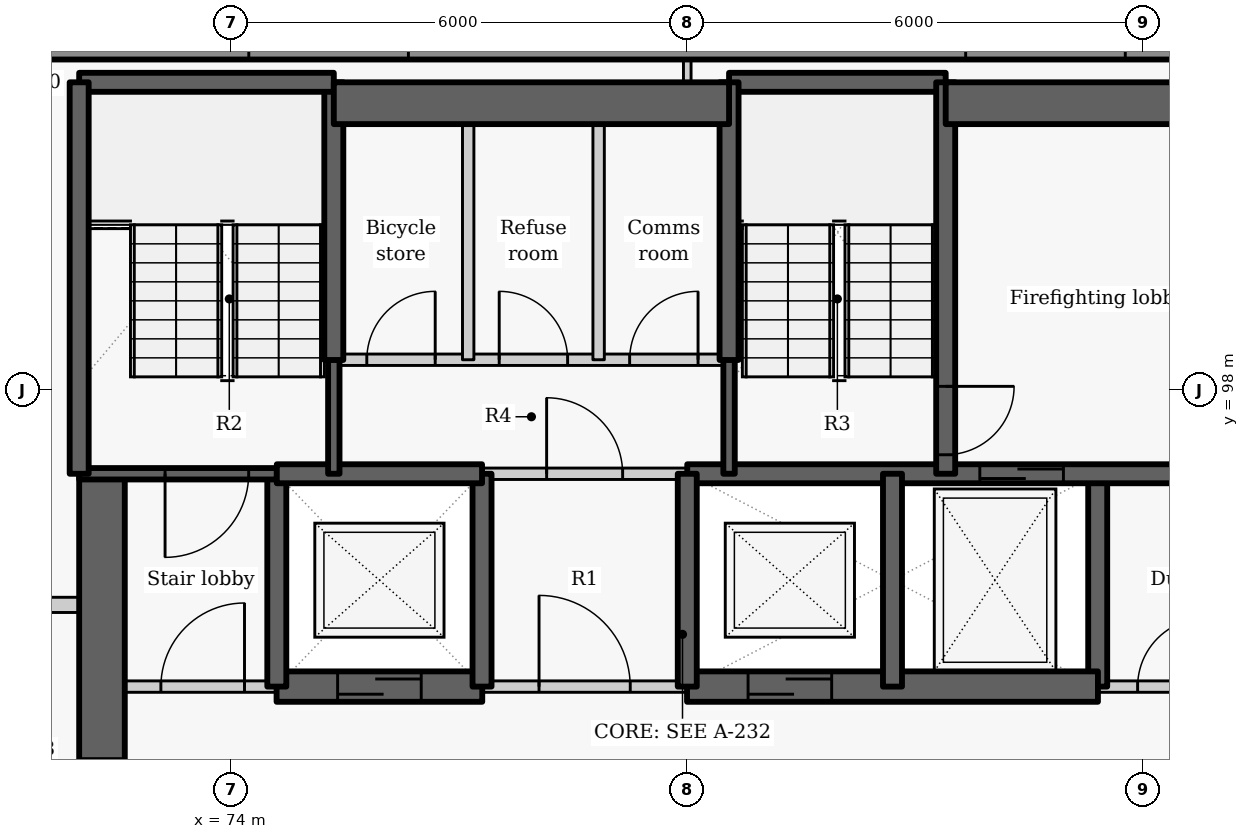
"""IFC4 building model, lengths in metres.
Left out: names, types, materials, properties, quantities, classifications, styles, units other than length and angle.
Written with IfcOpenShell. Run it as: python <this file> out.ifc"""

import sys

from ifc_helpers import new_model, si_unit, direction, frame, frame_2d, origin, place, context, subcontext, project, spatial, rectangle, extrude, element, fill, save


model = new_model("IFC4")
c1 = context("Model", 3, precision=1e-05, world=origin(), true_north=direction((0.0, 1.0)))
c2 = subcontext(c1, "Body", "Model", "MODEL_VIEW")
j1 = project(units=[si_unit("LENGTHUNIT", "METRE"), si_unit("PLANEANGLEUNIT", "RADIAN")], contexts=[c1])
p1 = place(None, origin())
s1 = spatial("IfcSite", under=j1, at=p1, CompositionType="ELEMENT")
p2 = place(p1, origin())
s2 = spatial("IfcBuilding", under=s1, at=p2, CompositionType="ELEMENT")
p3 = place(p2, frame((0.0, 0.0, 180.0)))
s3 = spatial("IfcBuildingStorey", under=s2, at=p3, CompositionType="ELEMENT", Elevation=180.0)
p4 = place(p3, frame((89.449, 102.5, 0.0), z_axis=(0.0, 0.0, 1.0), x_axis=(-1.0, 0.0, 0.0)))
e1 = element("IfcWall", 1, at=p4, inside=s3, PredefinedType="SOLIDWALL", context=c2, shape_type="SweptSolid", body=[
    extrude(rectangle(XDim=18.933, YDim=0.3, at=frame_2d((9.466, 0.0))), origin(), (0.0, 0.0, 1.0), 2.425),
])
p5 = place(p4, frame((3.687, 0.0, 0.9)))
e2 = element("IfcOpeningElement", 2, at=p5, cuts=e1, PredefinedType="OPENING", context=c2, shape_type="SweptSolid", body=[
    extrude(rectangle(XDim=2.1, YDim=1.1, at=frame_2d((1.05, 0.55))), frame((0.0, 0.16, 0.0), z_axis=(0.0, -1.0, 0.0), x_axis=(1.0, 0.0, 0.0)), (0.0, 0.0, 1.0), 0.32),
])
p6 = place(p4, frame((13.118, 0.0, 0.9)))
e3 = element("IfcOpeningElement", 3, at=p6, cuts=e1, PredefinedType="OPENING", context=c2, shape_type="SweptSolid", body=[
    extrude(rectangle(XDim=2.1, YDim=1.1, at=frame_2d((1.05, 0.55))), frame((0.0, 0.16, 0.0), z_axis=(0.0, -1.0, 0.0), x_axis=(1.0, 0.0, 0.0)), (0.0, 0.0, 1.0), 0.32),
])
p7 = place(p3, frame((72.3, 87.8, -0.275), z_axis=(0.0, 0.0, 1.0), x_axis=(0.0, 1.0, 0.0)))
e4 = element("IfcWall", 4, at=p7, inside=s3, PredefinedType="SHEAR", context=c2, shape_type="SweptSolid", body=[
    extrude(rectangle(XDim=9.1, YDim=0.6, at=frame_2d((4.55, 0.0))), origin(), (0.0, 0.0, 1.0), 3.3),
])
p8 = place(p7, frame((3.852, 0.0, 0.275)))
e5 = element("IfcOpeningElement", 5, at=p8, cuts=e4, PredefinedType="OPENING", context=c2, shape_type="SweptSolid", body=[
    extrude(rectangle(XDim=1.5, YDim=2.1, at=frame_2d((0.75, 1.05))), frame((0.0, 0.31, 0.0), z_axis=(0.0, -1.0, 0.0), x_axis=(1.0, 0.0, 0.0)), (0.0, 0.0, 1.0), 0.62),
])
p9 = place(p3, frame((85.4, 94.1, -0.275), z_axis=(0.0, 0.0, 1.0), x_axis=(0.0, 1.0, 0.0)))
e6 = element("IfcWall", 6, at=p9, inside=s3, PredefinedType="SHEAR", context=c2, shape_type="SweptSolid", body=[
    extrude(rectangle(XDim=2.8, YDim=0.25, at=frame_2d((1.4, 0.0))), origin(), (0.0, 0.0, 1.0), 3.3),
])
p10 = place(p3, frame((72.0, 94.1, 0.0), z_axis=(0.0, 0.0, 1.0), x_axis=(1.0, 0.0, 0.0)))
e7 = element("IfcWall", 7, at=p10, inside=s3, PredefinedType="PARTITIONING", context=c2, shape_type="SweptSolid", body=[
    extrude(rectangle(XDim=2.603, YDim=0.15, at=frame_2d((1.302, 0.0))), origin(), (0.0, 0.0, 1.0), 3.025),
])
p11 = place(p10, frame((1.075, 0.0, 0.0)))
e8 = element("IfcOpeningElement", 8, at=p11, cuts=e7, PredefinedType="OPENING", context=c2, shape_type="SweptSolid", body=[
    extrude(rectangle(XDim=1.1, YDim=2.1, at=frame_2d((0.55, 1.05))), frame((0.0, 0.085, 0.0), z_axis=(0.0, -1.0, 0.0), x_axis=(1.0, 0.0, 0.0)), (0.0, 0.0, 1.0), 0.17),
])
p12 = place(p3, frame((77.297, 94.1, 0.0), z_axis=(0.0, 0.0, 1.0), x_axis=(1.0, 0.0, 0.0)))
e9 = element("IfcWall", 9, at=p12, inside=s3, PredefinedType="PARTITIONING", context=c2, shape_type="SweptSolid", body=[
    extrude(rectangle(XDim=2.706, YDim=0.15, at=frame_2d((1.353, 0.0))), origin(), (0.0, 0.0, 1.0), 3.025),
])
p13 = place(p12, frame((0.753, 0.0, 0.0)))
e10 = element("IfcOpeningElement", 10, at=p13, cuts=e9, PredefinedType="OPENING", context=c2, shape_type="SweptSolid", body=[
    extrude(rectangle(XDim=1.2, YDim=2.1, at=frame_2d((0.6, 1.05))), frame((0.0, 0.085, 0.0), z_axis=(0.0, -1.0, 0.0), x_axis=(1.0, 0.0, 0.0)), (0.0, 0.0, 1.0), 0.17),
])
p14 = place(p3, frame((85.397, 94.1, 0.0), z_axis=(0.0, 0.0, 1.0), x_axis=(1.0, 0.0, 0.0)))
e11 = element("IfcWall", 11, at=p14, inside=s3, PredefinedType="PARTITIONING", context=c2, shape_type="SweptSolid", body=[
    extrude(rectangle(XDim=2.603, YDim=0.15, at=frame_2d((1.302, 0.0))), origin(), (0.0, 0.0, 1.0), 3.025),
])
p15 = place(p14, frame((0.528, 0.0, 0.0)))
e12 = element("IfcOpeningElement", 12, at=p15, cuts=e11, PredefinedType="OPENING", context=c2, shape_type="SweptSolid", body=[
    extrude(rectangle(XDim=0.9, YDim=2.1, at=frame_2d((0.45, 1.05))), frame((0.0, 0.085, 0.0), z_axis=(0.0, -1.0, 0.0), x_axis=(1.0, 0.0, 0.0)), (0.0, 0.0, 1.0), 0.17),
])
p16 = place(p3, frame((74.597, 94.1, -0.275), z_axis=(0.0, 0.0, 1.0), x_axis=(1.0, 0.0, 0.0)))
e13 = element("IfcWall", 13, at=p16, inside=s3, PredefinedType="SHEAR", context=c2, shape_type="SweptSolid", body=[
    extrude(rectangle(XDim=2.706, YDim=0.4, at=frame_2d((1.353, 0.0))), origin(), (0.0, 0.0, 1.0), 3.3),
])
p17 = place(p16, frame((0.803, 0.0, 0.275)))
e14 = element("IfcOpeningElement", 14, at=p17, cuts=e13, PredefinedType="OPENING", context=c2, shape_type="SweptSolid", body=[
    extrude(rectangle(XDim=1.1, YDim=2.1, at=frame_2d((0.55, 1.05))), frame((0.0, 0.21, 0.0), z_axis=(0.0, -1.0, 0.0), x_axis=(1.0, 0.0, 0.0)), (0.0, 0.0, 1.0), 0.42),
])
p18 = place(p3, frame((79.997, 94.1, -0.275), z_axis=(0.0, 0.0, 1.0), x_axis=(1.0, 0.0, 0.0)))
e15 = element("IfcWall", 15, at=p18, inside=s3, PredefinedType="SHEAR", context=c2, shape_type="SweptSolid", body=[
    extrude(rectangle(XDim=5.406, YDim=0.4, at=frame_2d((2.703, 0.0))), origin(), (0.0, 0.0, 1.0), 3.3),
])
p19 = place(p18, frame((0.803, 0.0, 0.275)))
e16 = element("IfcOpeningElement", 16, at=p19, cuts=e15, PredefinedType="OPENING", context=c2, shape_type="SweptSolid", body=[
    extrude(rectangle(XDim=1.1, YDim=2.1, at=frame_2d((0.55, 1.05))), frame((0.0, 0.21, 0.0), z_axis=(0.0, -1.0, 0.0), x_axis=(1.0, 0.0, 0.0)), (0.0, 0.0, 1.0), 0.42),
])
p20 = place(p3, frame((74.6, 94.1, -0.275), z_axis=(0.0, 0.0, 1.0), x_axis=(0.0, 1.0, 0.0)))
e17 = element("IfcWall", 17, at=p20, inside=s3, PredefinedType="SHEAR", context=c2, shape_type="SweptSolid", body=[
    extrude(rectangle(XDim=2.8, YDim=0.25, at=frame_2d((1.4, 0.0))), origin(), (0.0, 0.0, 1.0), 3.3),
])
p21 = place(p3, frame((74.6, 96.9, -0.275), z_axis=(0.0, 0.0, 1.0), x_axis=(-1.0, 0.0, 0.0)))
e18 = element("IfcWall", 18, at=p21, inside=s3, PredefinedType="SHEAR", context=c2, shape_type="SweptSolid", body=[
    extrude(rectangle(XDim=2.6, YDim=0.15, at=frame_2d((1.3, 0.0))), origin(), (0.0, 0.0, 1.0), 3.3),
])
p22 = place(p21, frame((0.37, 0.0, 0.275)))
e19 = element("IfcOpeningElement", 19, at=p22, cuts=e18, PredefinedType="OPENING", context=c2, shape_type="SweptSolid", body=[
    extrude(rectangle(XDim=1.1, YDim=2.1, at=frame_2d((0.55, 1.05))), frame((0.0, 0.085, 0.0), z_axis=(0.0, -1.0, 0.0), x_axis=(1.0, 0.0, 0.0)), (0.0, 0.0, 1.0), 0.17),
])
p23 = place(p3, frame((77.3, 94.1, -0.275), z_axis=(0.0, 0.0, 1.0), x_axis=(0.0, 1.0, 0.0)))
e20 = element("IfcWall", 20, at=p23, inside=s3, PredefinedType="SHEAR", context=c2, shape_type="SweptSolid", body=[
    extrude(rectangle(XDim=2.8, YDim=0.25, at=frame_2d((1.4, 0.0))), origin(), (0.0, 0.0, 1.0), 3.3),
])
p24 = place(p3, frame((74.6, 96.9, -0.275), z_axis=(0.0, 0.0, 1.0), x_axis=(1.0, 0.0, 0.0)))
e21 = element("IfcWall", 21, at=p24, inside=s3, PredefinedType="SHEAR", context=c2, shape_type="SweptSolid", body=[
    extrude(rectangle(XDim=2.7, YDim=0.25, at=frame_2d((1.35, 0.0))), origin(), (0.0, 0.0, 1.0), 3.3),
])
p25 = place(p3, frame((80.0, 96.9, -0.275), z_axis=(0.0, 0.0, 1.0), x_axis=(1.0, 0.0, 0.0)))
e22 = element("IfcWall", 22, at=p25, inside=s3, PredefinedType="SHEAR", context=c2, shape_type="SweptSolid", body=[
    extrude(rectangle(XDim=8.0, YDim=0.25, at=frame_2d((4.0, 0.0))), origin(), (0.0, 0.0, 1.0), 3.3),
])
p26 = place(p25, frame((3.849, 0.0, 0.275)))
e23 = element("IfcOpeningElement", 23, at=p26, cuts=e22, PredefinedType="OPENING", context=c2, shape_type="SweptSolid", body=[
    extrude(rectangle(XDim=1.1, YDim=2.1, at=frame_2d((0.55, 1.05))), frame((0.0, 0.135, 0.0), z_axis=(0.0, -1.0, 0.0), x_axis=(1.0, 0.0, 0.0)), (0.0, 0.0, 1.0), 0.27),
])
p27 = place(p3, frame((80.0, 94.1, -0.275), z_axis=(0.0, 0.0, 1.0), x_axis=(0.0, 1.0, 0.0)))
e24 = element("IfcWall", 24, at=p27, inside=s3, PredefinedType="SHEAR", context=c2, shape_type="SweptSolid", body=[
    extrude(rectangle(XDim=2.8, YDim=0.25, at=frame_2d((1.4, 0.0))), origin(), (0.0, 0.0, 1.0), 3.3),
])
p28 = place(p3, frame((77.3, 96.9, 0.0), z_axis=(0.0, 0.0, 1.0), x_axis=(1.0, 0.0, 0.0)))
e25 = element("IfcWall", 25, at=p28, inside=s3, PredefinedType="PARTITIONING", context=c2, shape_type="SweptSolid", body=[
    extrude(rectangle(XDim=2.7, YDim=0.15, at=frame_2d((1.35, 0.0))), origin(), (0.0, 0.0, 1.0), 3.025),
])
p29 = place(p28, frame((0.85, 0.0, 0.0)))
e26 = element("IfcOpeningElement", 26, at=p29, cuts=e25, PredefinedType="OPENING", context=c2, shape_type="SweptSolid", body=[
    extrude(rectangle(XDim=1.0, YDim=2.1, at=frame_2d((0.5, 1.05))), frame((0.0, 0.085, 0.0), z_axis=(0.0, -1.0, 0.0), x_axis=(1.0, 0.0, 0.0)), (0.0, 0.0, 1.0), 0.17),
])
p30 = place(p3, frame((82.7, 94.1, -0.275), z_axis=(0.0, 0.0, 1.0), x_axis=(0.0, 1.0, 0.0)))
e27 = element("IfcWall", 27, at=p30, inside=s3, PredefinedType="SHEAR", context=c2, shape_type="SweptSolid", body=[
    extrude(rectangle(XDim=2.8, YDim=0.25, at=frame_2d((1.4, 0.0))), origin(), (0.0, 0.0, 1.0), 3.3),
])
p31 = place(p3, frame((75.35, 96.9, -0.275), z_axis=(0.0, 0.0, 1.0), x_axis=(0.0, 1.0, 0.0)))
e28 = element("IfcWall", 28, at=p31, inside=s3, PredefinedType="SHEAR", context=c2, shape_type="SweptSolid", body=[
    extrude(rectangle(XDim=1.503, YDim=0.15, at=frame_2d((0.751, 0.0))), origin(), (0.0, 0.0, 1.0), 3.3),
])
p32 = place(p3, frame((75.35, 98.397, -0.275), z_axis=(0.0, 0.0, 1.0), x_axis=(0.0, 1.0, 0.0)))
e29 = element("IfcWall", 29, at=p32, inside=s3, PredefinedType="SHEAR", context=c2, shape_type="SweptSolid", body=[
    extrude(rectangle(XDim=3.653, YDim=0.25, at=frame_2d((1.827, 0.0))), origin(), (0.0, 0.0, 1.0), 3.3),
])
p33 = place(p3, frame((72.0, 102.05, -0.275), z_axis=(0.0, 0.0, 1.0), x_axis=(1.0, 0.0, 0.0)))
e30 = element("IfcWall", 30, at=p33, inside=s3, PredefinedType="SHEAR", context=c2, shape_type="SweptSolid", body=[
    extrude(rectangle(XDim=3.35, YDim=0.25, at=frame_2d((1.675, 0.0))), origin(), (0.0, 0.0, 1.0), 3.3),
])
p34 = place(p3, frame((80.55, 102.05, -0.275), z_axis=(0.0, 0.0, 1.0), x_axis=(1.0, 0.0, 0.0)))
e31 = element("IfcWall", 31, at=p34, inside=s3, PredefinedType="SHEAR", context=c2, shape_type="SweptSolid", body=[
    extrude(rectangle(XDim=2.85, YDim=0.25, at=frame_2d((1.425, 0.0))), origin(), (0.0, 0.0, 1.0), 3.3),
])
p35 = place(p3, frame((72.0, 96.9, -0.275), z_axis=(0.0, 0.0, 1.0), x_axis=(0.0, 1.0, 0.0)))
e32 = element("IfcWall", 32, at=p35, inside=s3, PredefinedType="SHEAR", context=c2, shape_type="SweptSolid", body=[
    extrude(rectangle(XDim=5.15, YDim=0.25, at=frame_2d((2.575, 0.0))), origin(), (0.0, 0.0, 1.0), 3.3),
])
p36 = place(p3, frame((83.4, 102.05, -0.275), z_axis=(0.0, 0.0, 1.0), x_axis=(0.0, -1.0, 0.0)))
e33 = element("IfcWall", 33, at=p36, inside=s3, PredefinedType="SHEAR", context=c2, shape_type="SweptSolid", body=[
    extrude(rectangle(XDim=5.15, YDim=0.25, at=frame_2d((2.575, 0.0))), origin(), (0.0, 0.0, 1.0), 3.3),
])
p37 = place(p36, frame((4.0, 0.0, 0.275)))
e34 = element("IfcOpeningElement", 34, at=p37, cuts=e33, PredefinedType="OPENING", context=c2, shape_type="SweptSolid", body=[
    extrude(rectangle(XDim=0.9, YDim=2.1, at=frame_2d((0.45, 1.05))), frame((0.0, 0.135, 0.0), z_axis=(0.0, -1.0, 0.0), x_axis=(1.0, 0.0, 0.0)), (0.0, 0.0, 1.0), 0.27),
])
p38 = place(p3, frame((80.55, 96.9, -0.275), z_axis=(0.0, 0.0, 1.0), x_axis=(0.0, 1.0, 0.0)))
e35 = element("IfcWall", 35, at=p38, inside=s3, PredefinedType="SHEAR", context=c2, shape_type="SweptSolid", body=[
    extrude(rectangle(XDim=1.503, YDim=0.15, at=frame_2d((0.751, 0.0))), origin(), (0.0, 0.0, 1.0), 3.3),
])
p39 = place(p3, frame((80.55, 98.397, -0.275), z_axis=(0.0, 0.0, 1.0), x_axis=(0.0, 1.0, 0.0)))
e36 = element("IfcWall", 36, at=p39, inside=s3, PredefinedType="SHEAR", context=c2, shape_type="SweptSolid", body=[
    extrude(rectangle(XDim=3.653, YDim=0.25, at=frame_2d((1.827, 0.0))), origin(), (0.0, 0.0, 1.0), 3.3),
])
p40 = place(p3, frame((75.35, 101.775, -0.275), z_axis=(0.0, 0.0, 1.0), x_axis=(1.0, 0.0, 0.0)))
e37 = element("IfcWall", 37, at=p40, inside=s3, PredefinedType="SHEAR", context=c2, shape_type="SweptSolid", body=[
    extrude(rectangle(XDim=5.2, YDim=0.55, at=frame_2d((2.6, 0.0))), origin(), (0.0, 0.0, 1.0), 3.3),
])
p41 = place(p3, frame((83.4, 101.775, -0.275), z_axis=(0.0, 0.0, 1.0), x_axis=(1.0, 0.0, 0.0)))
e38 = element("IfcWall", 38, at=p41, inside=s3, PredefinedType="SHEAR", context=c2, shape_type="SweptSolid", body=[
    extrude(rectangle(XDim=4.6, YDim=0.55, at=frame_2d((2.3, 0.0))), origin(), (0.0, 0.0, 1.0), 3.3),
])
p42 = place(p3, frame((75.35, 98.4, 0.0), z_axis=(0.0, 0.0, 1.0), x_axis=(1.0, 0.0, 0.0)))
e39 = element("IfcWall", 39, at=p42, inside=s3, PredefinedType="PARTITIONING", context=c2, shape_type="SweptSolid", body=[
    extrude(rectangle(XDim=5.2, YDim=0.15, at=frame_2d((2.6, 0.0))), origin(), (0.0, 0.0, 1.0), 3.025),
])
p43 = place(p42, frame((0.434, 0.0, 0.0)))
e40 = element("IfcOpeningElement", 40, at=p43, cuts=e39, PredefinedType="OPENING", context=c2, shape_type="SweptSolid", body=[
    extrude(rectangle(XDim=0.9, YDim=2.1, at=frame_2d((0.45, 1.05))), frame((0.0, 0.085, 0.0), z_axis=(0.0, -1.0, 0.0), x_axis=(1.0, 0.0, 0.0)), (0.0, 0.0, 1.0), 0.17),
])
p44 = place(p42, frame((2.176, 0.0, 0.0)))
e41 = element("IfcOpeningElement", 41, at=p44, cuts=e39, PredefinedType="OPENING", context=c2, shape_type="SweptSolid", body=[
    extrude(rectangle(XDim=0.9, YDim=2.1, at=frame_2d((0.45, 1.05))), frame((0.0, 0.085, 0.0), z_axis=(0.0, -1.0, 0.0), x_axis=(1.0, 0.0, 0.0)), (0.0, 0.0, 1.0), 0.17),
])
p45 = place(p42, frame((3.892, 0.0, 0.0)))
e42 = element("IfcOpeningElement", 42, at=p45, cuts=e39, PredefinedType="OPENING", context=c2, shape_type="SweptSolid", body=[
    extrude(rectangle(XDim=0.9, YDim=2.1, at=frame_2d((0.45, 1.05))), frame((0.0, 0.085, 0.0), z_axis=(0.0, -1.0, 0.0), x_axis=(1.0, 0.0, 0.0)), (0.0, 0.0, 1.0), 0.17),
])
for number, where, z_axis, x_axis in (
    (43, (77.118, 98.4, 0.0), (0.0, 0.0, 1.0), (0.0, 1.0, 0.0)),
    (44, (78.834, 98.4, 0.0), (0.0, 0.0, 1.0), (0.0, 1.0, 0.0)),
):
    element("IfcWall", number, at=place(p3, frame(where, z_axis=z_axis, x_axis=x_axis)), inside=s3, PredefinedType="PARTITIONING", context=c2, shape_type="SweptSolid", body=[
        extrude(rectangle(XDim=3.65, YDim=0.15, at=frame_2d((1.825, 0.0))), origin(), (0.0, 0.0, 1.0), 3.025),
    ])
p46 = place(p3, frame((69.587, 95.175, 0.0), z_axis=(0.0, 0.0, 1.0), x_axis=(1.0, 0.0, 0.0)))
e45 = element("IfcWall", 45, at=p46, inside=s3, PredefinedType="PARTITIONING", context=c2, shape_type="SweptSolid", body=[
    extrude(rectangle(XDim=2.413, YDim=0.2, at=frame_2d((1.207, 0.0))), origin(), (0.0, 0.0, 1.0), 2.505),
])
p47 = place(p3, frame((80.0, 102.05, 0.0), z_axis=(0.0, 0.0, 1.0), x_axis=(0.0, 1.0, 0.0)))
e46 = element("IfcWall", 46, at=p47, inside=s3, PredefinedType="PARTITIONING", context=c2, shape_type="SweptSolid", body=[
    extrude(rectangle(XDim=0.3, YDim=0.1, at=frame_2d((0.15, 0.0))), origin(), (0.0, 0.0, 1.0), 3.025),
])
p48 = place(p11, origin())
e47 = element("IfcDoor", 47, at=p48, inside=s3, OperationType="SINGLE_SWING_RIGHT", PredefinedType="DOOR", context=c2, shape_type="SweptSolid", body=[
    extrude(rectangle(XDim=1.1, YDim=2.1, at=frame_2d((0.55, 1.05))), frame((0.0, 0.025, 0.0), z_axis=(0.0, -1.0, 0.0), x_axis=(1.0, 0.0, 0.0)), (0.0, 0.0, 1.0), 0.05),
])
fill(e8, e47)
p49 = place(p17, origin())
e48 = element("IfcDoor", 48, at=p49, inside=s3, OperationType="SLIDING_TO_LEFT", PredefinedType="DOOR", context=c2, shape_type="SweptSolid", body=[
    extrude(rectangle(XDim=1.1, YDim=2.1, at=frame_2d((0.55, 1.05))), frame((0.0, 0.025, 0.0), z_axis=(0.0, -1.0, 0.0), x_axis=(1.0, 0.0, 0.0)), (0.0, 0.0, 1.0), 0.05),
])
fill(e14, e48)
p50 = place(p13, origin())
e49 = element("IfcDoor", 49, at=p50, inside=s3, OperationType="DOUBLE_DOOR_SINGLE_SWING", PredefinedType="DOOR", context=c2, shape_type="SweptSolid", body=[
    extrude(rectangle(XDim=1.2, YDim=2.1, at=frame_2d((0.6, 1.05))), frame((0.0, 0.025, 0.0), z_axis=(0.0, -1.0, 0.0), x_axis=(1.0, 0.0, 0.0)), (0.0, 0.0, 1.0), 0.05),
])
fill(e10, e49)
p51 = place(p19, origin())
e50 = element("IfcDoor", 50, at=p51, inside=s3, OperationType="SLIDING_TO_LEFT", PredefinedType="DOOR", context=c2, shape_type="SweptSolid", body=[
    extrude(rectangle(XDim=1.1, YDim=2.1, at=frame_2d((0.55, 1.05))), frame((0.0, 0.025, 0.0), z_axis=(0.0, -1.0, 0.0), x_axis=(1.0, 0.0, 0.0)), (0.0, 0.0, 1.0), 0.05),
])
fill(e16, e50)
p52 = place(p26, origin())
e51 = element("IfcDoor", 51, at=p52, inside=s3, OperationType="SLIDING_TO_LEFT", PredefinedType="DOOR", context=c2, shape_type="SweptSolid", body=[
    extrude(rectangle(XDim=1.1, YDim=2.1, at=frame_2d((0.55, 1.05))), frame((0.0, 0.025, 0.0), z_axis=(0.0, -1.0, 0.0), x_axis=(1.0, 0.0, 0.0)), (0.0, 0.0, 1.0), 0.05),
])
fill(e23, e51)
p53 = place(p15, origin())
e52 = element("IfcDoor", 52, at=p53, inside=s3, OperationType="SINGLE_SWING_RIGHT", PredefinedType="DOOR", context=c2, shape_type="SweptSolid", body=[
    extrude(rectangle(XDim=0.9, YDim=2.1, at=frame_2d((0.45, 1.05))), frame((0.0, 0.025, 0.0), z_axis=(0.0, -1.0, 0.0), x_axis=(1.0, 0.0, 0.0)), (0.0, 0.0, 1.0), 0.05),
])
fill(e12, e52)
p54 = place(p29, origin())
e53 = element("IfcDoor", 53, at=p54, inside=s3, OperationType="SINGLE_SWING_LEFT", PredefinedType="DOOR", context=c2, shape_type="SweptSolid", body=[
    extrude(rectangle(XDim=1.0, YDim=2.1, at=frame_2d((0.5, 1.05))), frame((0.0, 0.025, 0.0), z_axis=(0.0, -1.0, 0.0), x_axis=(1.0, 0.0, 0.0)), (0.0, 0.0, 1.0), 0.05),
])
fill(e26, e53)
p55 = place(p43, origin())
e54 = element("IfcDoor", 54, at=p55, inside=s3, OperationType="SINGLE_SWING_RIGHT", PredefinedType="DOOR", context=c2, shape_type="SweptSolid", body=[
    extrude(rectangle(XDim=0.9, YDim=2.1, at=frame_2d((0.45, 1.05))), frame((0.0, 0.025, 0.0), z_axis=(0.0, -1.0, 0.0), x_axis=(1.0, 0.0, 0.0)), (0.0, 0.0, 1.0), 0.05),
])
fill(e40, e54)
p56 = place(p44, origin())
e55 = element("IfcDoor", 55, at=p56, inside=s3, OperationType="SINGLE_SWING_LEFT", PredefinedType="DOOR", context=c2, shape_type="SweptSolid", body=[
    extrude(rectangle(XDim=0.9, YDim=2.1, at=frame_2d((0.45, 1.05))), frame((0.0, 0.025, 0.0), z_axis=(0.0, -1.0, 0.0), x_axis=(1.0, 0.0, 0.0)), (0.0, 0.0, 1.0), 0.05),
])
fill(e41, e55)
p57 = place(p45, origin())
e56 = element("IfcDoor", 56, at=p57, inside=s3, OperationType="SINGLE_SWING_RIGHT", PredefinedType="DOOR", context=c2, shape_type="SweptSolid", body=[
    extrude(rectangle(XDim=0.9, YDim=2.1, at=frame_2d((0.45, 1.05))), frame((0.0, 0.025, 0.0), z_axis=(0.0, -1.0, 0.0), x_axis=(1.0, 0.0, 0.0)), (0.0, 0.0, 1.0), 0.05),
])
fill(e42, e56)
p58 = place(p22, origin())
e57 = element("IfcDoor", 57, at=p58, inside=s3, OperationType="SINGLE_SWING_RIGHT", PredefinedType="DOOR", context=c2, shape_type="SweptSolid", body=[
    extrude(rectangle(XDim=1.1, YDim=2.1, at=frame_2d((0.55, 1.05))), frame((0.0, 0.025, 0.0), z_axis=(0.0, -1.0, 0.0), x_axis=(1.0, 0.0, 0.0)), (0.0, 0.0, 1.0), 0.05),
])
fill(e19, e57)
p59 = place(p37, origin())
e58 = element("IfcDoor", 58, at=p59, inside=s3, OperationType="SINGLE_SWING_LEFT", PredefinedType="DOOR", context=c2, shape_type="SweptSolid", body=[
    extrude(rectangle(XDim=0.9, YDim=2.1, at=frame_2d((0.45, 1.05))), frame((0.0, 0.025, 0.0), z_axis=(0.0, -1.0, 0.0), x_axis=(1.0, 0.0, 0.0)), (0.0, 0.0, 1.0), 0.05),
])
fill(e34, e58)
p60 = place(p8, origin())
e59 = element("IfcDoor", 59, at=p60, inside=s3, OperationType="DOUBLE_DOOR_SINGLE_SWING", PredefinedType="DOOR", context=c2, shape_type="SweptSolid", body=[
    extrude(rectangle(XDim=1.5, YDim=2.1, at=frame_2d((0.75, 1.05))), frame((0.0, 0.025, 0.0), z_axis=(0.0, -1.0, 0.0), x_axis=(1.0, 0.0, 0.0)), (0.0, 0.0, 1.0), 0.05),
])
fill(e5, e59)
save(model, sys.argv[1])
